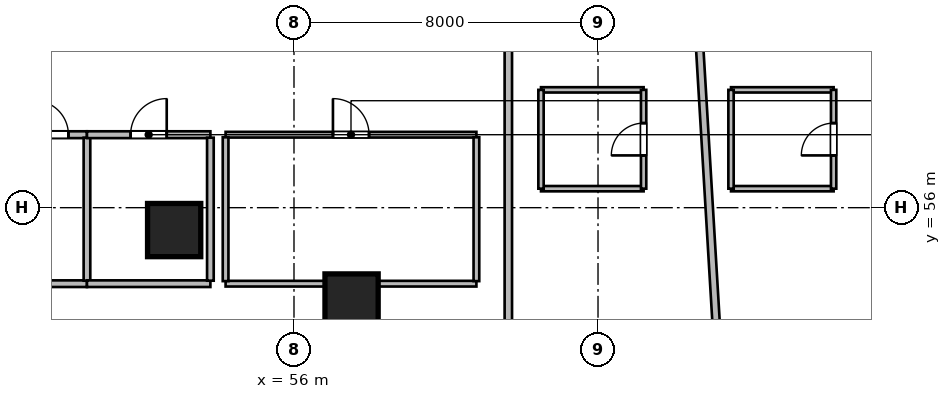
"""IFC4 building model, lengths in metres.
Left out: names, types, materials, properties, quantities, classifications, styles, units other than length and angle.
Written with IfcOpenShell. Run it as: python <this file> out.ifc"""

import sys

from ifc_helpers import new_model, si_unit, direction, frame, frame_2d, origin, origin_2d, place, context, subcontext, project, spatial, rectangle, circle, extrude, source, transform, mapped, element, fill, save


model = new_model("IFC4")
c1 = context("Model", 3, precision=1e-05, world=origin(), true_north=direction((0.0, 1.0)))
c2 = subcontext(c1, "Body", "Model", "MODEL_VIEW")
j1 = project(units=[si_unit("LENGTHUNIT", "METRE"), si_unit("PLANEANGLEUNIT", "RADIAN")], contexts=[c1])
p1 = place(None, origin())
s1 = spatial("IfcSite", under=j1, at=p1, CompositionType="ELEMENT")
p2 = place(p1, origin())
s2 = spatial("IfcBuilding", under=s1, at=p2, CompositionType="ELEMENT")
p3 = place(p2, frame((0.0, 0.0, 82.2)))
s3 = spatial("IfcBuildingStorey", under=s2, at=p3, CompositionType="ELEMENT", Elevation=82.2)
m1 = source(origin(), c2, "Body", "SweptSolid", [
    extrude(circle(Radius=0.7, at=origin_2d()), origin(), (0.0, 0.0, 1.0), 3.6),
])
for number, where, z_axis, x_axis in (
    (1, (52.846, 55.411, 0.0), (0.0, 0.0, 1.0), (0.143, 0.99, 0.0)),
    (2, (57.515, 53.558, 0.0), (0.0, 0.0, 1.0), (0.289, 0.957, 0.0)),
):
    element("IfcColumn", number, at=place(p3, frame(where, z_axis=z_axis, x_axis=x_axis)), inside=s3, PredefinedType="COLUMN", context=c2, shape_type="MappedRepresentation", body=[
        mapped(m1, transform((0.0, 0.0, 0.0), scale=1.0)),
    ])
m2 = source(origin(), c2, "Body", "SweptSolid", [
    extrude(rectangle(XDim=4.176, YDim=0.175, at=frame_2d((2.088, 0.0))), origin(), (0.0, 0.0, 1.0), 3.28),
])
p4 = place(p3, frame((46.376, 54.0, 0.0), z_axis=(0.0, 0.0, 1.0), x_axis=(1.0, 0.0, 0.0)))
e3 = element("IfcWall", 3, at=p4, inside=s3, PredefinedType="PARTITIONING", context=c2, shape_type="MappedRepresentation", body=[
    mapped(m2, transform((0.0, 0.0, 0.0), scale=1.0)),
])
m3 = source(origin(), c2, "Body", "SweptSolid", [
    extrude(rectangle(XDim=4.176, YDim=0.18, at=frame_2d((2.088, 0.0))), origin(), (0.0, 0.0, 1.0), 3.28),
])
p5 = place(p3, frame((46.376, 57.92, 0.0), z_axis=(0.0, 0.0, 1.0), x_axis=(1.0, 0.0, 0.0)))
e4 = element("IfcWall", 4, at=p5, inside=s3, PredefinedType="PLUMBINGWALL", context=c2, shape_type="MappedRepresentation", body=[
    mapped(m3, transform((0.0, 0.0, 0.0), scale=1.0)),
])
p6 = place(p5, frame((2.788, 0.0, 0.0)))
e5 = element("IfcOpeningElement", 5, at=p6, cuts=e4, PredefinedType="OPENING", context=c2, shape_type="SweptSolid", body=[
    extrude(rectangle(XDim=0.9, YDim=2.08, at=frame_2d((0.45, 1.04))), frame((0.0, 0.1, 0.0), z_axis=(0.0, -1.0, 0.0), x_axis=(1.0, 0.0, 0.0)), (0.0, 0.0, 1.0), 0.2),
])
m4 = source(origin(), c2, "Body", "SweptSolid", [
    extrude(rectangle(XDim=3.763, YDim=0.175, at=frame_2d((1.881, 0.0))), origin(), (0.0, 0.0, 1.0), 3.28),
])
p7 = place(p3, frame((50.552, 54.079, 0.0), z_axis=(0.0, 0.0, 1.0), x_axis=(0.0, 1.0, 0.0)))
e6 = element("IfcWall", 6, at=p7, inside=s3, PredefinedType="PARTITIONING", context=c2, shape_type="MappedRepresentation", body=[
    mapped(m4, transform((0.0, 0.0, 0.0), scale=1.0)),
])
m5 = source(origin(), c2, "Body", "SweptSolid", [
    extrude(rectangle(XDim=3.248, YDim=0.175, at=frame_2d((1.624, 0.0))), origin(), (0.0, 0.0, 1.0), 3.28),
])
p8 = place(p3, frame((50.552, 54.0, 0.0), z_axis=(0.0, 0.0, 1.0), x_axis=(1.0, 0.0, 0.0)))
e7 = element("IfcWall", 7, at=p8, inside=s3, PredefinedType="PARTITIONING", context=c2, shape_type="MappedRepresentation", body=[
    mapped(m5, transform((0.0, 0.0, 0.0), scale=1.0)),
])
m6 = source(origin(), c2, "Body", "SweptSolid", [
    extrude(rectangle(XDim=3.248, YDim=0.18, at=frame_2d((1.624, 0.0))), origin(), (0.0, 0.0, 1.0), 3.28),
])
p9 = place(p3, frame((50.552, 57.92, 0.0), z_axis=(0.0, 0.0, 1.0), x_axis=(1.0, 0.0, 0.0)))
e8 = element("IfcWall", 8, at=p9, inside=s3, PredefinedType="PLUMBINGWALL", context=c2, shape_type="MappedRepresentation", body=[
    mapped(m6, transform((0.0, 0.0, 0.0), scale=1.0)),
])
p10 = place(p9, frame((1.149, 0.0, 0.0)))
e9 = element("IfcOpeningElement", 9, at=p10, cuts=e8, PredefinedType="OPENING", context=c2, shape_type="SweptSolid", body=[
    extrude(rectangle(XDim=0.95, YDim=2.12, at=frame_2d((0.475, 1.06))), frame((0.0, 0.1, 0.0), z_axis=(0.0, -1.0, 0.0), x_axis=(1.0, 0.0, 0.0)), (0.0, 0.0, 1.0), 0.2),
])
p11 = place(p3, frame((53.8, 54.079, 0.0), z_axis=(0.0, 0.0, 1.0), x_axis=(0.0, 1.0, 0.0)))
e10 = element("IfcWall", 10, at=p11, inside=s3, PredefinedType="PARTITIONING", context=c2, shape_type="MappedRepresentation", body=[
    mapped(m4, transform((0.0, 0.0, 0.0), scale=1.0)),
])
m7 = source(origin(), c2, "Body", "SweptSolid", [
    extrude(rectangle(XDim=6.6, YDim=0.15, at=frame_2d((3.3, 0.0))), origin(), (0.0, 0.0, 1.0), 2.723),
])
p12 = place(p3, frame((54.2, 54.0, 0.0), z_axis=(0.0, 0.0, 1.0), x_axis=(1.0, 0.0, 0.0)))
e11 = element("IfcWall", 11, at=p12, inside=s3, PredefinedType="PARTITIONING", context=c2, shape_type="MappedRepresentation", body=[
    mapped(m7, transform((0.0, 0.0, 0.0), scale=1.0)),
])
m8 = source(origin(), c2, "Body", "SweptSolid", [
    extrude(rectangle(XDim=6.6, YDim=0.15, at=frame_2d((3.3, 0.0))), origin(), (0.0, 0.0, 1.0), 3.28),
])
p13 = place(p3, frame((54.2, 57.92, 0.0), z_axis=(0.0, 0.0, 1.0), x_axis=(1.0, 0.0, 0.0)))
e12 = element("IfcWall", 12, at=p13, inside=s3, PredefinedType="PARTITIONING", context=c2, shape_type="MappedRepresentation", body=[
    mapped(m8, transform((0.0, 0.0, 0.0), scale=1.0)),
])
p14 = place(p13, frame((2.825, 0.0, 0.0)))
e13 = element("IfcOpeningElement", 13, at=p14, cuts=e12, PredefinedType="OPENING", context=c2, shape_type="SweptSolid", body=[
    extrude(rectangle(XDim=0.95, YDim=2.1, at=frame_2d((0.475, 1.05))), frame((0.0, 0.085, 0.0), z_axis=(0.0, -1.0, 0.0), x_axis=(1.0, 0.0, 0.0)), (0.0, 0.0, 1.0), 0.17),
])
m9 = source(origin(), c2, "Body", "SweptSolid", [
    extrude(rectangle(XDim=3.785, YDim=0.15, at=frame_2d((1.893, 0.0))), origin(), (0.0, 0.0, 1.0), 3.28),
])
for number, where, z_axis, x_axis in (
    (14, (54.2, 54.067, 0.0), (0.0, 0.0, 1.0), (0.0, 1.0, 0.0)),
    (15, (60.8, 54.067, 0.0), (0.0, 0.0, 1.0), (0.0, 1.0, 0.0)),
):
    element("IfcWall", number, at=place(p3, frame(where, z_axis=z_axis, x_axis=x_axis)), inside=s3, PredefinedType="PARTITIONING", context=c2, shape_type="MappedRepresentation", body=[
        mapped(m9, transform((0.0, 0.0, 0.0), scale=1.0)),
    ])
m10 = source(origin(), c2, "Body", "SweptSolid", [
    extrude(rectangle(XDim=16.134, YDim=0.195, at=frame_2d((8.067, 0.0))), origin(), (0.0, 0.0, 1.0), 2.564),
])
p15 = place(p3, frame((61.64, 45.326, 0.0), z_axis=(0.0, 0.0, 1.0), x_axis=(0.0, 1.0, 0.0)))
e16 = element("IfcWall", 16, at=p15, inside=s3, PredefinedType="PARTITIONING", context=c2, shape_type="MappedRepresentation", body=[
    mapped(m10, transform((0.0, 0.0, 0.0), scale=1.0)),
])
m11 = source(origin(), c2, "Body", "SweptSolid", [
    extrude(rectangle(XDim=24.889, YDim=0.195, at=frame_2d((12.444, 0.0))), origin(), (0.0, 0.0, 1.0), 2.564),
])
p16 = place(p3, frame((68.086, 36.616, 0.0), z_axis=(0.0, 0.0, 1.0), x_axis=(-0.059709317989, 0.998215807, 0.0)))
e17 = element("IfcWall", 17, at=p16, inside=s3, PredefinedType="PARTITIONING", context=c2, shape_type="MappedRepresentation", body=[
    mapped(m11, transform((0.0, 0.0, 0.0), scale=1.0)),
])
m12 = source(origin(), c2, "Body", "SweptSolid", [
    extrude(rectangle(XDim=2.7, YDim=0.14, at=frame_2d((1.35, 0.0))), origin(), (0.0, 0.0, 1.0), 3.28),
])
for number, where, z_axis, x_axis in (
    (18, (62.5, 59.1, 0.0), (0.0, 0.0, 1.0), (1.0, 0.0, 0.0)),
    (19, (62.5, 56.5, 0.0), (0.0, 0.0, 1.0), (1.0, 0.0, 0.0)),
):
    element("IfcWall", number, at=place(p3, frame(where, z_axis=z_axis, x_axis=x_axis)), inside=s3, PredefinedType="PARTITIONING", context=c2, shape_type="MappedRepresentation", body=[
        mapped(m12, transform((0.0, 0.0, 0.0), scale=1.0)),
    ])
m13 = source(origin(), c2, "Body", "SweptSolid", [
    extrude(rectangle(XDim=2.6, YDim=0.14, at=frame_2d((1.3, 0.0))), origin(), (0.0, 0.0, 1.0), 3.28),
])
p17 = place(p3, frame((62.5, 56.5, 0.0), z_axis=(0.0, 0.0, 1.0), x_axis=(0.0, 1.0, 0.0)))
e20 = element("IfcWall", 20, at=p17, inside=s3, PredefinedType="PARTITIONING", context=c2, shape_type="MappedRepresentation", body=[
    mapped(m13, transform((0.0, 0.0, 0.0), scale=1.0)),
])
p18 = place(p3, frame((65.2, 56.5, 0.0), z_axis=(0.0, 0.0, 1.0), x_axis=(0.0, 1.0, 0.0)))
e21 = element("IfcWall", 21, at=p18, inside=s3, PredefinedType="PARTITIONING", context=c2, shape_type="MappedRepresentation", body=[
    mapped(m13, transform((0.0, 0.0, 0.0), scale=1.0)),
])
p19 = place(p18, frame((0.875, 0.0, 0.0)))
e22 = element("IfcOpeningElement", 22, at=p19, cuts=e21, PredefinedType="OPENING", context=c2, shape_type="SweptSolid", body=[
    extrude(rectangle(XDim=0.85, YDim=2.05, at=frame_2d((0.425, 1.025))), frame((0.0, 0.08, 0.0), z_axis=(0.0, -1.0, 0.0), x_axis=(1.0, 0.0, 0.0)), (0.0, 0.0, 1.0), 0.16),
])
for number, where, z_axis, x_axis in (
    (23, (67.5, 59.1, 0.0), (0.0, 0.0, 1.0), (1.0, 0.0, 0.0)),
    (24, (67.5, 56.5, 0.0), (0.0, 0.0, 1.0), (1.0, 0.0, 0.0)),
):
    element("IfcWall", number, at=place(p3, frame(where, z_axis=z_axis, x_axis=x_axis)), inside=s3, PredefinedType="PARTITIONING", context=c2, shape_type="MappedRepresentation", body=[
        mapped(m12, transform((0.0, 0.0, 0.0), scale=1.0)),
    ])
m14 = source(origin(), c2, "Body", "SweptSolid", [
    extrude(rectangle(XDim=2.6, YDim=0.14, at=frame_2d((1.3, 0.0))), origin(), (0.0, 0.0, 1.0), 2.649),
])
p20 = place(p3, frame((67.5, 56.5, 0.0), z_axis=(0.0, 0.0, 1.0), x_axis=(0.0, 1.0, 0.0)))
e25 = element("IfcWall", 25, at=p20, inside=s3, PredefinedType="PARTITIONING", context=c2, shape_type="MappedRepresentation", body=[
    mapped(m14, transform((0.0, 0.0, 0.0), scale=1.0)),
])
m15 = source(origin(), c2, "Body", "SweptSolid", [
    extrude(rectangle(XDim=2.6, YDim=0.14, at=frame_2d((1.3, 0.0))), origin(), (0.0, 0.0, 1.0), 2.847),
])
p21 = place(p3, frame((70.2, 56.5, 0.0), z_axis=(0.0, 0.0, 1.0), x_axis=(0.0, 1.0, 0.0)))
e26 = element("IfcWall", 26, at=p21, inside=s3, PredefinedType="PARTITIONING", context=c2, shape_type="MappedRepresentation", body=[
    mapped(m15, transform((0.0, 0.0, 0.0), scale=1.0)),
])
p22 = place(p21, frame((0.875, 0.0, 0.0)))
e27 = element("IfcOpeningElement", 27, at=p22, cuts=e26, PredefinedType="OPENING", context=c2, shape_type="SweptSolid", body=[
    extrude(rectangle(XDim=0.85, YDim=2.05, at=frame_2d((0.425, 1.025))), frame((0.0, 0.08, 0.0), z_axis=(0.0, -1.0, 0.0), x_axis=(1.0, 0.0, 0.0)), (0.0, 0.0, 1.0), 0.16),
])
m16 = source(origin(), c2, "Body", "SweptSolid", [
    extrude(rectangle(XDim=0.9, YDim=2.08, at=frame_2d((0.45, 1.04))), frame((0.0, 0.025, 0.0), z_axis=(0.0, -1.0, 0.0), x_axis=(1.0, 0.0, 0.0)), (0.0, 0.0, 1.0), 0.05),
])
p23 = place(p6, origin())
e28 = element("IfcDoor", 28, at=p23, inside=s3, OperationType="SINGLE_SWING_LEFT", PredefinedType="DOOR", context=c2, shape_type="MappedRepresentation", body=[
    mapped(m16, transform((0.0, 0.0, 0.0), scale=1.0)),
])
fill(e5, e28)
m17 = source(origin(), c2, "Body", "SweptSolid", [
    extrude(rectangle(XDim=0.95, YDim=2.12, at=frame_2d((0.475, 1.06))), frame((0.0, 0.025, 0.0), z_axis=(0.0, -1.0, 0.0), x_axis=(1.0, 0.0, 0.0)), (0.0, 0.0, 1.0), 0.05),
])
p24 = place(p10, origin())
e29 = element("IfcDoor", 29, at=p24, inside=s3, OperationType="SINGLE_SWING_RIGHT", PredefinedType="DOOR", context=c2, shape_type="MappedRepresentation", body=[
    mapped(m17, transform((0.0, 0.0, 0.0), scale=1.0)),
])
fill(e9, e29)
m18 = source(origin(), c2, "Body", "SweptSolid", [
    extrude(rectangle(XDim=0.95, YDim=2.1, at=frame_2d((0.475, 1.05))), frame((0.0, 0.025, 0.0), z_axis=(0.0, -1.0, 0.0), x_axis=(1.0, 0.0, 0.0)), (0.0, 0.0, 1.0), 0.05),
])
p25 = place(p14, origin())
e30 = element("IfcDoor", 30, at=p25, inside=s3, OperationType="SINGLE_SWING_LEFT", PredefinedType="DOOR", context=c2, shape_type="MappedRepresentation", body=[
    mapped(m18, transform((0.0, 0.0, 0.0), scale=1.0)),
])
fill(e13, e30)
m19 = source(origin(), c2, "Body", "SweptSolid", [
    extrude(rectangle(XDim=0.85, YDim=2.05, at=frame_2d((0.425, 1.025))), frame((0.0, 0.025, 0.0), z_axis=(0.0, -1.0, 0.0), x_axis=(1.0, 0.0, 0.0)), (0.0, 0.0, 1.0), 0.05),
])
p26 = place(p19, origin())
e31 = element("IfcDoor", 31, at=p26, inside=s3, OperationType="SINGLE_SWING_LEFT", PredefinedType="DOOR", context=c2, shape_type="MappedRepresentation", body=[
    mapped(m19, transform((0.0, 0.0, 0.0), scale=1.0)),
])
fill(e22, e31)
p27 = place(p22, origin())
e32 = element("IfcDoor", 32, at=p27, inside=s3, OperationType="SINGLE_SWING_LEFT", PredefinedType="DOOR", context=c2, shape_type="MappedRepresentation", body=[
    mapped(m19, transform((0.0, 0.0, 0.0), scale=1.0)),
])
fill(e27, e32)
save(model, sys.argv[1])
